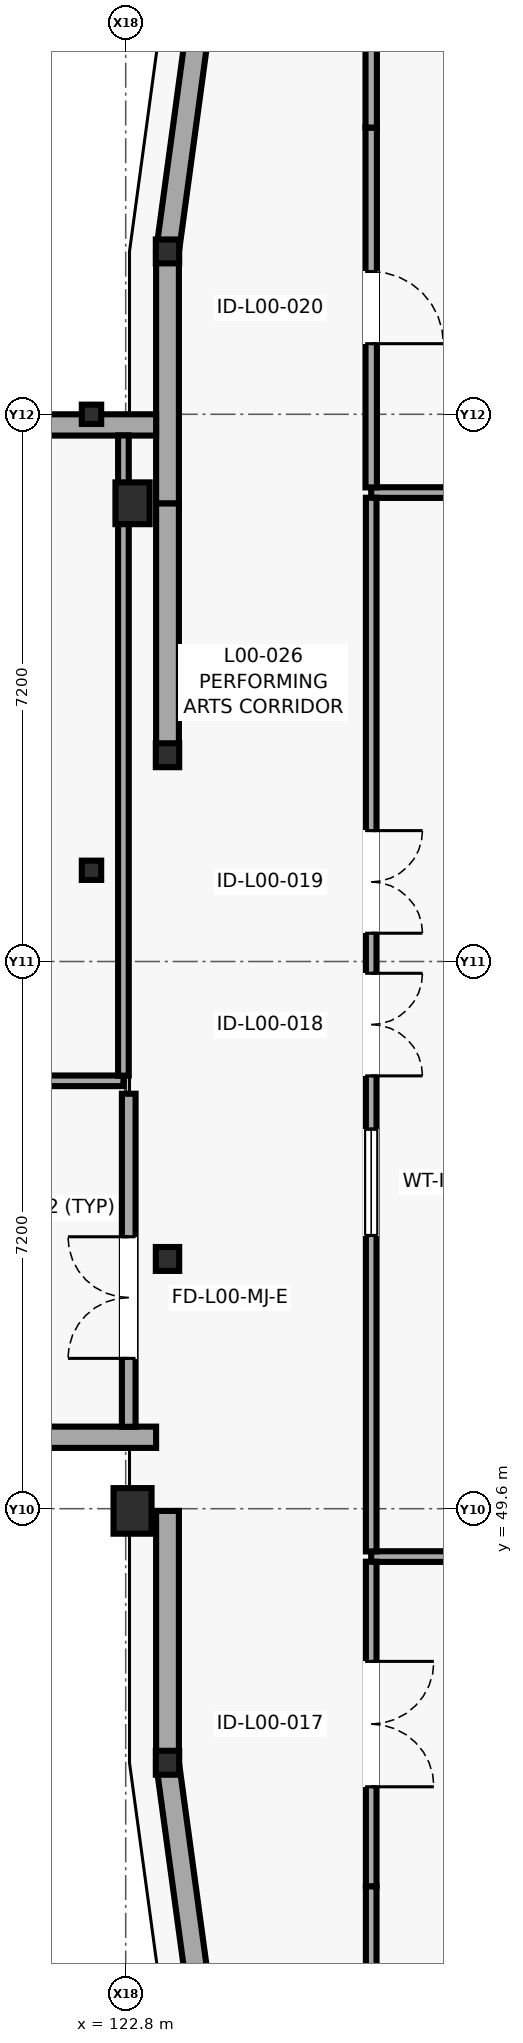
"""IFC4 building model, lengths in metres.
Left out: names, types, materials, properties, quantities, classifications, styles, units other than length and angle.
Written with IfcOpenShell. Run it as: python <this file> out.ifc"""

import sys

from ifc_helpers import new_model, si_unit, direction, frame, frame_2d, origin, origin_2d, place, context, subcontext, project, spatial, rectangle, i_section, extrude, element, fill, save


model = new_model("IFC4")
c1 = context("Model", 3, precision=1e-05, world=origin(), true_north=direction((0.0, 1.0)))
c2 = subcontext(c1, "Body", "Model", "MODEL_VIEW")
j1 = project(units=[si_unit("LENGTHUNIT", "METRE"), si_unit("PLANEANGLEUNIT", "RADIAN")], contexts=[c1])
p1 = place(None, origin())
s1 = spatial("IfcSite", under=j1, at=p1, CompositionType="ELEMENT")
p2 = place(p1, origin())
s2 = spatial("IfcBuilding", under=s1, at=p2, CompositionType="ELEMENT")
p3 = place(p2, origin())
s3 = spatial("IfcBuildingStorey", under=s2, at=p3, CompositionType="ELEMENT", Elevation=0.0)
for number, where, z_axis, x_axis in (
    (1, (122.35, 58.0, 0.0), (0.0, 0.0, 1.0), (1.0, 0.0, 0.0)),
    (2, (122.35, 64.0, 0.0), (0.0, 0.0, 1.0), (1.0, 0.0, 0.0)),
):
    element("IfcColumn", number, at=place(p3, frame(where, z_axis=z_axis, x_axis=x_axis)), inside=s3, PredefinedType="COLUMN", context=c2, shape_type="SweptSolid", body=[
        extrude(i_section(OverallWidth=0.255, OverallDepth=0.254, WebThickness=0.009, FlangeThickness=0.014, FilletRadius=0.013, at=origin_2d()), origin(), (0.0, 0.0, 1.0), 4.2),
    ])
p4 = place(p3, frame((122.89, 49.571, 0.0), z_axis=(0.0, 0.0, 1.0), x_axis=(1.0, 0.0, 0.0)))
e3 = element("IfcColumn", 3, at=p4, inside=s3, PredefinedType="PILASTER", context=c2, shape_type="SweptSolid", body=[
    extrude(rectangle(XDim=0.5, YDim=0.6, at=origin_2d()), origin(), (0.0, 0.0, 1.0), 4.2),
])
p5 = place(p3, frame((122.89, 62.829, 0.0), z_axis=(0.0, 0.0, 1.0), x_axis=(1.0, 0.0, 0.0)))
e4 = element("IfcColumn", 4, at=p5, inside=s3, PredefinedType="PILASTER", context=c2, shape_type="SweptSolid", body=[
    extrude(rectangle(XDim=0.45, YDim=0.55, at=origin_2d()), origin(), (0.0, 0.0, 1.0), 4.2),
])
for number, where, z_axis, x_axis in (
    (5, (123.35, 46.257, 0.0), (0.0, 0.0, 1.0), (1.0, 0.0, 0.0)),
    (6, (123.35, 52.886, 0.0), (0.0, 0.0, 1.0), (1.0, 0.0, 0.0)),
    (7, (123.35, 59.514, 0.0), (0.0, 0.0, 1.0), (1.0, 0.0, 0.0)),
    (8, (123.35, 66.143, 0.0), (0.0, 0.0, 1.0), (1.0, 0.0, 0.0)),
):
    element("IfcColumn", number, at=place(p3, frame(where, z_axis=z_axis, x_axis=x_axis)), inside=s3, PredefinedType="COLUMN", context=c2, shape_type="SweptSolid", body=[
        extrude(i_section(OverallWidth=0.307, OverallDepth=0.314, WebThickness=0.012, FlangeThickness=0.019, FilletRadius=0.015, at=origin_2d()), origin(), (0.0, 0.0, 1.0), 4.2),
    ])
p6 = place(p3, frame((123.35, 46.257, 0.0), z_axis=(0.0, 0.0, 1.0), x_axis=(0.134539839792, -0.990908185206, 0.0)))
e9 = element("IfcWall", 9, at=p6, inside=s3, PredefinedType="SOLIDWALL", context=c2, shape_type="SweptSolid", body=[
    extrude(rectangle(XDim=3.344, YDim=0.3, at=frame_2d((1.672, 0.0))), origin(), (0.0, 0.0, 1.0), 3.68),
])
p7 = place(p3, frame((123.35, 49.571, 0.0), z_axis=(0.0, 0.0, 1.0), x_axis=(0.0, -1.0, 0.0)))
e10 = element("IfcWall", 10, at=p7, inside=s3, PredefinedType="SOLIDWALL", context=c2, shape_type="SweptSolid", body=[
    extrude(rectangle(XDim=3.314, YDim=0.3, at=frame_2d((1.657, 0.0))), origin(), (0.0, 0.0, 1.0), 3.68),
])
p8 = place(p3, frame((123.35, 62.829, 0.0), z_axis=(0.0, 0.0, 1.0), x_axis=(0.0, -1.0, 0.0)))
e11 = element("IfcWall", 11, at=p8, inside=s3, PredefinedType="SOLIDWALL", context=c2, shape_type="SweptSolid", body=[
    extrude(rectangle(XDim=3.315, YDim=0.3, at=frame_2d((1.658, 0.0))), origin(), (0.0, 0.0, 1.0), 3.68),
])
p9 = place(p3, frame((123.35, 66.143, 0.0), z_axis=(0.0, 0.0, 1.0), x_axis=(0.0, -1.0, 0.0)))
e12 = element("IfcWall", 12, at=p9, inside=s3, PredefinedType="SOLIDWALL", context=c2, shape_type="SweptSolid", body=[
    extrude(rectangle(XDim=3.314, YDim=0.3, at=frame_2d((1.657, 0.0))), origin(), (0.0, 0.0, 1.0), 3.68),
])
p10 = place(p3, frame((123.8, 69.457, 0.0), z_axis=(0.0, 0.0, 1.0), x_axis=(-0.134539839792, -0.990908185206, 0.0)))
e13 = element("IfcWall", 13, at=p10, inside=s3, PredefinedType="SOLIDWALL", context=c2, shape_type="SweptSolid", body=[
    extrude(rectangle(XDim=3.344, YDim=0.3, at=frame_2d((1.672, 0.0))), origin(), (0.0, 0.0, 1.0), 3.68),
])
p11 = place(p3, frame((115.32, 50.54, 0.0), z_axis=(0.0, 0.0, 1.0), x_axis=(1.0, 0.0, 0.0)))
e14 = element("IfcWall", 14, at=p11, inside=s3, PredefinedType="SOLIDWALL", context=c2, shape_type="SweptSolid", body=[
    extrude(rectangle(XDim=7.88, YDim=0.28, at=frame_2d((3.94, 0.0))), origin(), (0.0, 0.0, 1.0), 3.98),
])
p12 = place(p11, frame((3.08, 0.0, 0.0)))
e15 = element("IfcOpeningElement", 15, at=p12, cuts=e14, PredefinedType="OPENING", context=c2, shape_type="SweptSolid", body=[
    extrude(rectangle(XDim=1.6, YDim=2.3, at=frame_2d((0.8, 1.15))), frame((0.0, 0.15, 0.0), z_axis=(0.0, -1.0, 0.0), x_axis=(1.0, 0.0, 0.0)), (0.0, 0.0, 1.0), 0.3),
])
p13 = place(p11, frame((1.395, 0.0, 1.05)))
e16 = element("IfcOpeningElement", 16, at=p13, cuts=e14, PredefinedType="OPENING", context=c2, shape_type="SweptSolid", body=[
    extrude(rectangle(XDim=1.15, YDim=1.4, at=frame_2d((0.575, 0.7))), frame((0.0, 0.15, 0.0), z_axis=(0.0, -1.0, 0.0), x_axis=(1.0, 0.0, 0.0)), (0.0, 0.0, 1.0), 0.3),
])
p14 = place(p11, frame((5.385, 0.0, 1.05)))
e17 = element("IfcOpeningElement", 17, at=p14, cuts=e14, PredefinedType="OPENING", context=c2, shape_type="SweptSolid", body=[
    extrude(rectangle(XDim=1.05, YDim=1.3, at=frame_2d((0.525, 0.65))), frame((0.0, 0.15, 0.0), z_axis=(0.0, -1.0, 0.0), x_axis=(1.0, 0.0, 0.0)), (0.0, 0.0, 1.0), 0.3),
])
p15 = place(p3, frame((123.2, 63.86, 0.0), z_axis=(0.0, 0.0, 1.0), x_axis=(-1.0, 0.0, 0.0)))
e18 = element("IfcWall", 18, at=p15, inside=s3, PredefinedType="SOLIDWALL", context=c2, shape_type="SweptSolid", body=[
    extrude(rectangle(XDim=7.88, YDim=0.28, at=frame_2d((3.94, 0.0))), origin(), (0.0, 0.0, 1.0), 3.375),
])
p16 = place(p15, frame((1.62, 0.0, 1.05)))
e19 = element("IfcOpeningElement", 19, at=p16, cuts=e18, PredefinedType="OPENING", context=c2, shape_type="SweptSolid", body=[
    extrude(rectangle(XDim=1.6, YDim=1.35, at=frame_2d((0.8, 0.675))), frame((0.0, 0.15, 0.0), z_axis=(0.0, -1.0, 0.0), x_axis=(1.0, 0.0, 0.0)), (0.0, 0.0, 1.0), 0.3),
])
p17 = place(p15, frame((4.81, 0.0, 1.05)))
e20 = element("IfcOpeningElement", 20, at=p17, cuts=e18, PredefinedType="OPENING", context=c2, shape_type="SweptSolid", body=[
    extrude(rectangle(XDim=2.2, YDim=1.35, at=frame_2d((1.1, 0.675))), frame((0.0, 0.15, 0.0), z_axis=(0.0, -1.0, 0.0), x_axis=(1.0, 0.0, 0.0)), (0.0, 0.0, 1.0), 0.3),
])
p18 = place(p3, frame((122.84, 50.678, 0.0), z_axis=(0.0, 0.0, 1.0), x_axis=(0.0, 1.0, 0.0)))
e21 = element("IfcWall", 21, at=p18, inside=s3, PredefinedType="PARTITIONING", context=c2, shape_type="SweptSolid", body=[
    extrude(rectangle(XDim=4.382, YDim=0.18, at=frame_2d((2.191, 0.0))), origin(), (0.0, 0.0, 1.0), 3.98),
])
p19 = place(p18, frame((0.9, 0.0, 0.0)))
e22 = element("IfcOpeningElement", 22, at=p19, cuts=e21, PredefinedType="OPENING", context=c2, shape_type="SweptSolid", body=[
    extrude(rectangle(XDim=1.6, YDim=2.25, at=frame_2d((0.8, 1.125))), frame((0.0, 0.1, 0.0), z_axis=(0.0, -1.0, 0.0), x_axis=(1.0, 0.0, 0.0)), (0.0, 0.0, 1.0), 0.2),
])
p20 = place(p3, frame((155.579, 48.97, 0.0), z_axis=(0.0, 0.0, 1.0), x_axis=(-1.0, 0.0, 0.0)))
e23 = element("IfcWall", 23, at=p20, inside=s3, PredefinedType="PARTITIONING", context=c2, shape_type="SweptSolid", body=[
    extrude(rectangle(XDim=29.549, YDim=0.14, at=frame_2d((14.774, 0.0))), origin(), (0.0, 0.0, 1.0), 3.93),
])
p21 = place(p3, frame((126.03, 48.902, 0.0), z_axis=(0.0, 0.0, 1.0), x_axis=(0.0, -1.0, 0.0)))
e24 = element("IfcWall", 24, at=p21, inside=s3, PredefinedType="PARTITIONING", context=c2, shape_type="SweptSolid", body=[
    extrude(rectangle(XDim=4.272, YDim=0.14, at=frame_2d((2.136, 0.0))), origin(), (0.0, 0.0, 1.0), 3.93),
])
p22 = place(p21, frame((1.311, 0.0, 0.0)))
e25 = element("IfcOpeningElement", 25, at=p22, cuts=e24, PredefinedType="OPENING", context=c2, shape_type="SweptSolid", body=[
    extrude(rectangle(XDim=1.65, YDim=2.32, at=frame_2d((0.825, 1.16))), frame((0.0, 0.08, 0.0), z_axis=(0.0, -1.0, 0.0), x_axis=(1.0, 0.0, 0.0)), (0.0, 0.0, 1.0), 0.16),
])
p23 = place(p3, frame((126.03, 44.63, 0.0), z_axis=(0.0, 0.0, 1.0), x_axis=(0.0, -1.0, 0.0)))
e26 = element("IfcWall", 26, at=p23, inside=s3, PredefinedType="PARTITIONING", context=c2, shape_type="SweptSolid", body=[
    extrude(rectangle(XDim=8.664, YDim=0.14, at=frame_2d((4.332, 0.0))), origin(), (0.0, 0.0, 1.0), 3.93),
])
p24 = place(p3, frame((155.653, 62.97, 0.0), z_axis=(0.0, 0.0, 1.0), x_axis=(-1.0, 0.0, 0.0)))
e27 = element("IfcWall", 27, at=p24, inside=s3, PredefinedType="PARTITIONING", context=c2, shape_type="SweptSolid", body=[
    extrude(rectangle(XDim=29.623, YDim=0.14, at=frame_2d((14.812, 0.0))), origin(), (0.0, 0.0, 1.0), 3.93),
])
p25 = place(p3, frame((126.03, 62.902, 0.0), z_axis=(0.0, 0.0, 1.0), x_axis=(0.0, -1.0, 0.0)))
e28 = element("IfcWall", 28, at=p25, inside=s3, PredefinedType="PARTITIONING", context=c2, shape_type="SweptSolid", body=[
    extrude(rectangle(XDim=13.864, YDim=0.14, at=frame_2d((6.932, 0.0))), origin(), (0.0, 0.0, 1.0), 3.93),
])
p26 = place(p25, frame((6.257, 0.0, 0.0)))
e29 = element("IfcOpeningElement", 29, at=p26, cuts=e28, PredefinedType="OPENING", context=c2, shape_type="SweptSolid", body=[
    extrude(rectangle(XDim=1.35, YDim=2.25, at=frame_2d((0.675, 1.125))), frame((0.0, 0.08, 0.0), z_axis=(0.0, -1.0, 0.0), x_axis=(1.0, 0.0, 0.0)), (0.0, 0.0, 1.0), 0.16),
])
p27 = place(p25, frame((4.38, 0.0, 0.0)))
e30 = element("IfcOpeningElement", 30, at=p27, cuts=e28, PredefinedType="OPENING", context=c2, shape_type="SweptSolid", body=[
    extrude(rectangle(XDim=1.35, YDim=2.25, at=frame_2d((0.675, 1.125))), frame((0.0, 0.08, 0.0), z_axis=(0.0, -1.0, 0.0), x_axis=(1.0, 0.0, 0.0)), (0.0, 0.0, 1.0), 0.16),
])
p28 = place(p25, frame((8.307, 0.0, 1.05)))
e31 = element("IfcOpeningElement", 31, at=p28, cuts=e28, PredefinedType="OPENING", context=c2, shape_type="SweptSolid", body=[
    extrude(rectangle(XDim=1.4, YDim=1.05, at=frame_2d((0.7, 0.525))), frame((0.0, 0.08, 0.0), z_axis=(0.0, -1.0, 0.0), x_axis=(1.0, 0.0, 0.0)), (0.0, 0.0, 1.0), 0.16),
])
p29 = place(p3, frame((126.03, 76.434, 0.0), z_axis=(0.0, 0.0, 1.0), x_axis=(0.0, -1.0, 0.0)))
e32 = element("IfcWall", 32, at=p29, inside=s3, PredefinedType="PARTITIONING", context=c2, shape_type="SweptSolid", body=[
    extrude(rectangle(XDim=8.664, YDim=0.15, at=frame_2d((4.332, 0.0))), origin(), (0.0, 0.0, 1.0), 3.93),
])
p30 = place(p3, frame((126.03, 67.77, 0.0), z_axis=(0.0, 0.0, 1.0), x_axis=(0.0, -1.0, 0.0)))
e33 = element("IfcWall", 33, at=p30, inside=s3, PredefinedType="PARTITIONING", context=c2, shape_type="SweptSolid", body=[
    extrude(rectangle(XDim=4.732, YDim=0.15, at=frame_2d((2.366, 0.0))), origin(), (0.0, 0.0, 1.0), 3.93),
])
p31 = place(p30, frame((1.891, 0.0, 0.0)))
e34 = element("IfcOpeningElement", 34, at=p31, cuts=e33, PredefinedType="OPENING", context=c2, shape_type="SweptSolid", body=[
    extrude(rectangle(XDim=0.95, YDim=2.1, at=frame_2d((0.475, 1.05))), frame((0.0, 0.085, 0.0), z_axis=(0.0, -1.0, 0.0), x_axis=(1.0, 0.0, 0.0)), (0.0, 0.0, 1.0), 0.17),
])
p32 = place(p3, frame((115.63, 55.23, 0.0), z_axis=(0.0, 0.0, 1.0), x_axis=(1.0, 0.0, 0.0)))
e35 = element("IfcWall", 35, at=p32, inside=s3, PredefinedType="PARTITIONING", context=c2, shape_type="SweptSolid", body=[
    extrude(rectangle(XDim=7.14, YDim=0.14, at=frame_2d((3.57, 0.0))), origin(), (0.0, 0.0, 1.0), 3.975),
])
p33 = place(p3, frame((122.77, 55.298, 0.0), z_axis=(0.0, 0.0, 1.0), x_axis=(0.0, 1.0, 0.0)))
e36 = element("IfcWall", 36, at=p33, inside=s3, PredefinedType="PARTITIONING", context=c2, shape_type="SweptSolid", body=[
    extrude(rectangle(XDim=8.424, YDim=0.14, at=frame_2d((4.212, 0.0))), origin(), (0.0, 0.0, 1.0), 3.975),
])
p34 = place(p19, origin())
e37 = element("IfcDoor", 37, at=p34, inside=s3, OperationType="DOUBLE_DOOR_SINGLE_SWING", PredefinedType="DOOR", context=c2, shape_type="SweptSolid", body=[
    extrude(rectangle(XDim=1.6, YDim=2.25, at=frame_2d((0.8, 1.125))), frame((0.0, 0.025, 0.0), z_axis=(0.0, -1.0, 0.0), x_axis=(1.0, 0.0, 0.0)), (0.0, 0.0, 1.0), 0.05),
])
fill(e22, e37)
p35 = place(p22, origin())
e38 = element("IfcDoor", 38, at=p35, inside=s3, OperationType="DOUBLE_DOOR_SINGLE_SWING", PredefinedType="DOOR", context=c2, shape_type="SweptSolid", body=[
    extrude(rectangle(XDim=1.65, YDim=2.32, at=frame_2d((0.825, 1.16))), frame((0.0, 0.025, 0.0), z_axis=(0.0, -1.0, 0.0), x_axis=(1.0, 0.0, 0.0)), (0.0, 0.0, 1.0), 0.05),
])
fill(e25, e38)
p36 = place(p26, origin())
e39 = element("IfcDoor", 39, at=p36, inside=s3, OperationType="DOUBLE_DOOR_SINGLE_SWING", PredefinedType="DOOR", context=c2, shape_type="SweptSolid", body=[
    extrude(rectangle(XDim=1.35, YDim=2.25, at=frame_2d((0.675, 1.125))), frame((0.0, 0.025, 0.0), z_axis=(0.0, -1.0, 0.0), x_axis=(1.0, 0.0, 0.0)), (0.0, 0.0, 1.0), 0.05),
])
fill(e29, e39)
p37 = place(p27, origin())
e40 = element("IfcDoor", 40, at=p37, inside=s3, OperationType="DOUBLE_DOOR_SINGLE_SWING", PredefinedType="DOOR", context=c2, shape_type="SweptSolid", body=[
    extrude(rectangle(XDim=1.35, YDim=2.25, at=frame_2d((0.675, 1.125))), frame((0.0, 0.025, 0.0), z_axis=(0.0, -1.0, 0.0), x_axis=(1.0, 0.0, 0.0)), (0.0, 0.0, 1.0), 0.05),
])
fill(e30, e40)
p38 = place(p28, origin())
e41 = element("IfcWindow", 41, at=p38, inside=s3, PartitioningType="SINGLE_PANEL", PredefinedType="WINDOW", context=c2, shape_type="SweptSolid", body=[
    extrude(rectangle(XDim=1.4, YDim=1.05, at=frame_2d((0.7, 0.525))), frame((0.0, 0.03, 0.0), z_axis=(0.0, -1.0, 0.0), x_axis=(1.0, 0.0, 0.0)), (0.0, 0.0, 1.0), 0.06),
])
fill(e31, e41)
p39 = place(p31, origin())
e42 = element("IfcDoor", 42, at=p39, inside=s3, OperationType="SINGLE_SWING_RIGHT", PredefinedType="DOOR", context=c2, shape_type="SweptSolid", body=[
    extrude(rectangle(XDim=0.95, YDim=2.1, at=frame_2d((0.475, 1.05))), frame((0.0, 0.025, 0.0), z_axis=(0.0, -1.0, 0.0), x_axis=(1.0, 0.0, 0.0)), (0.0, 0.0, 1.0), 0.05),
])
fill(e34, e42)
save(model, sys.argv[1])
